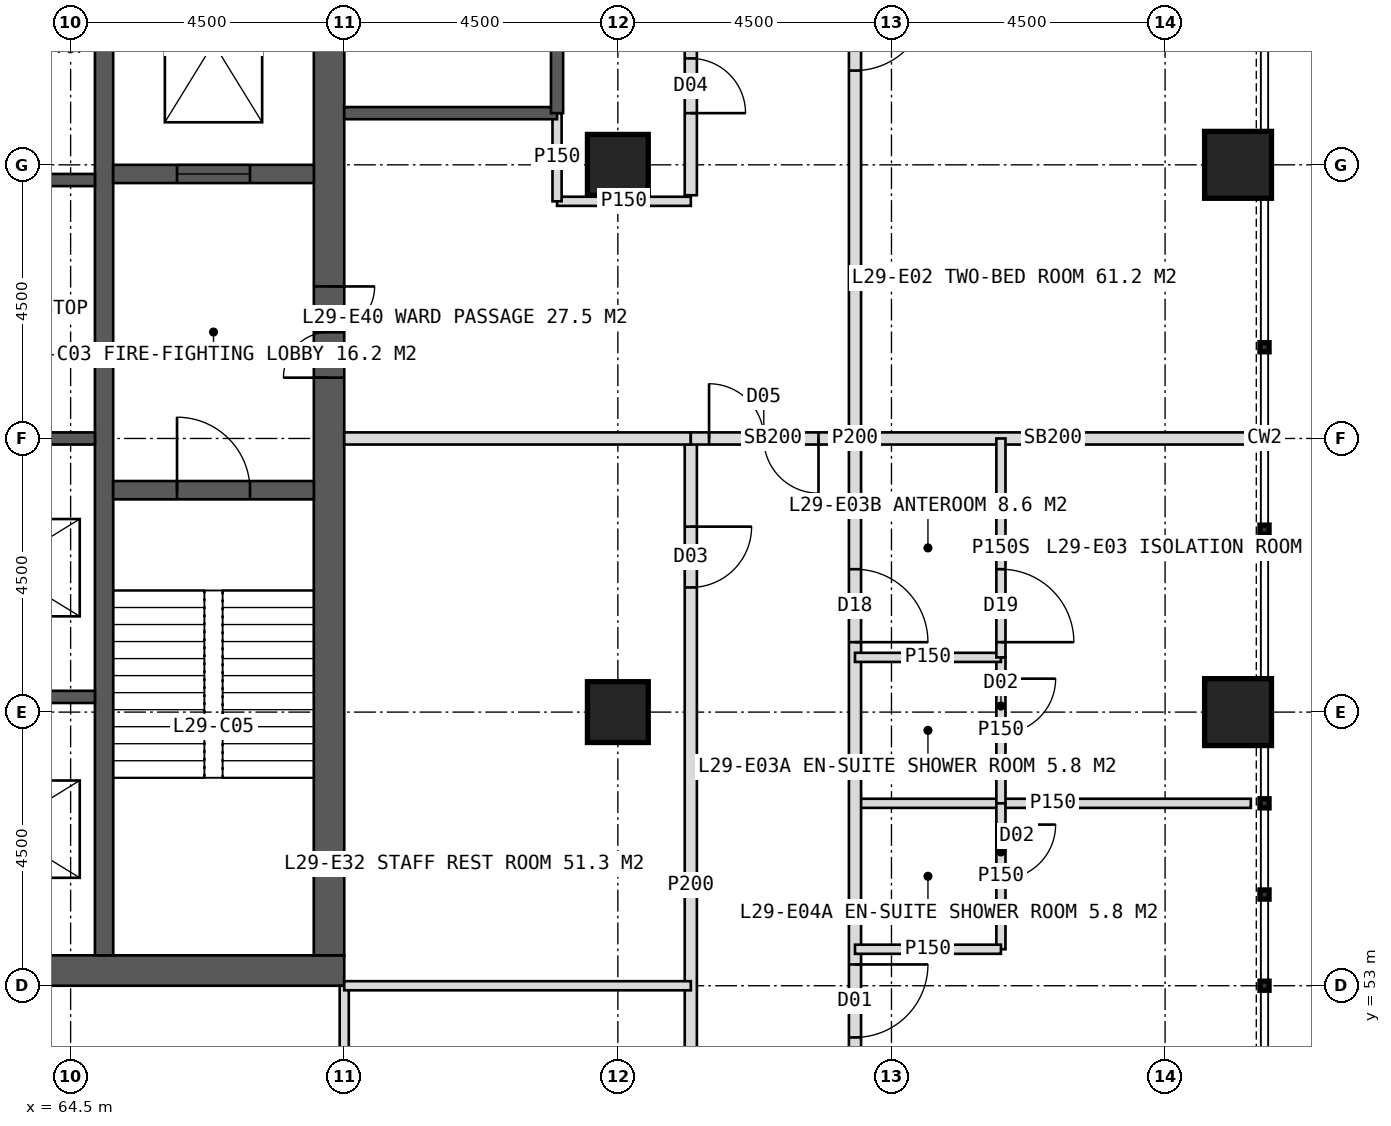
"""IFC4 building model, lengths in metres.
Left out: names, types, materials, properties, quantities, classifications, styles, units other than length and angle.
Written with IfcOpenShell. Run it as: python <this file> out.ifc"""

import sys

from ifc_helpers import new_model, si_unit, direction, frame, frame_2d, origin, origin_2d, place, context, subcontext, project, spatial, rectangle, hollow_rectangle, extrude, element, fill, save


model = new_model("IFC4")
c1 = context("Model", 3, precision=1e-05, world=origin(), true_north=direction((0.0, 1.0)))
c2 = subcontext(c1, "Body", "Model", "MODEL_VIEW")
j1 = project(units=[si_unit("LENGTHUNIT", "METRE"), si_unit("PLANEANGLEUNIT", "RADIAN")], contexts=[c1])
p1 = place(None, origin())
s1 = spatial("IfcSite", under=j1, at=p1, CompositionType="ELEMENT")
p2 = place(p1, origin())
s2 = spatial("IfcBuilding", under=s1, at=p2, CompositionType="ELEMENT")
p3 = place(p2, frame((0.0, 0.0, 124.0)))
s3 = spatial("IfcBuildingStorey", under=s2, at=p3, CompositionType="ELEMENT", Elevation=124.0)
p4 = place(p3, frame((51.0, 53.25, 0.0), z_axis=(0.0, 0.0, 1.0), x_axis=(1.0, 0.0, 0.0)))
e1 = element("IfcWall", 1, at=p4, inside=s3, PredefinedType="SHEAR", context=c2, shape_type="SweptSolid", body=[
    extrude(rectangle(XDim=18.0, YDim=0.5, at=frame_2d((9.0, 0.0))), origin(), (0.0, 0.0, 1.0), 4.0),
])
p5 = place(p4, frame((8.1, 0.0, 0.0)))
e2 = element("IfcOpeningElement", 2, at=p5, cuts=e1, PredefinedType="OPENING", context=c2, shape_type="SweptSolid", body=[
    extrude(rectangle(XDim=1.8, YDim=2.2, at=frame_2d((0.9, 1.1))), frame((0.0, 0.26, 0.0), z_axis=(0.0, -1.0, 0.0), x_axis=(1.0, 0.0, 0.0)), (0.0, 0.0, 1.0), 0.52),
])
p6 = place(p3, frame((68.75, 53.5, 0.0), z_axis=(0.0, 0.0, 1.0), x_axis=(0.0, 1.0, 0.0)))
e3 = element("IfcWall", 3, at=p6, inside=s3, PredefinedType="SHEAR", context=c2, shape_type="SweptSolid", body=[
    extrude(rectangle(XDim=17.0, YDim=0.5, at=frame_2d((8.5, 0.0))), origin(), (0.0, 0.0, 1.0), 4.0),
])
p7 = place(p6, frame((9.5, 0.0, 0.0)))
e4 = element("IfcOpeningElement", 4, at=p7, cuts=e3, PredefinedType="OPENING", context=c2, shape_type="SweptSolid", body=[
    extrude(rectangle(XDim=1.5, YDim=2.2, at=frame_2d((0.75, 1.1))), frame((0.0, 0.26, 0.0), z_axis=(0.0, -1.0, 0.0), x_axis=(1.0, 0.0, 0.0)), (0.0, 0.0, 1.0), 0.52),
])
p8 = place(p3, frame((65.05, 53.5, 0.0), z_axis=(0.0, 0.0, 1.0), x_axis=(0.0, 1.0, 0.0)))
e5 = element("IfcWall", 5, at=p8, inside=s3, PredefinedType="SHEAR", context=c2, shape_type="SweptSolid", body=[
    extrude(rectangle(XDim=17.0, YDim=0.3, at=frame_2d((8.5, 0.0))), origin(), (0.0, 0.0, 1.0), 4.0),
])
for number, where, z_axis, x_axis in (
    (6, (61.85, 57.75, 0.0), (0.0, 0.0, 1.0), (1.0, 0.0, 0.0)),
    (7, (61.85, 62.0, 0.0), (0.0, 0.0, 1.0), (1.0, 0.0, 0.0)),
    (8, (61.85, 66.25, 0.0), (0.0, 0.0, 1.0), (1.0, 0.0, 0.0)),
):
    element("IfcWall", number, at=place(p3, frame(where, z_axis=z_axis, x_axis=x_axis)), inside=s3, PredefinedType="SHEAR", context=c2, shape_type="SweptSolid", body=[
        extrude(rectangle(XDim=3.05, YDim=0.2, at=frame_2d((1.525, 0.0))), origin(), (0.0, 0.0, 1.0), 4.0),
    ])
p9 = place(p3, frame((65.2, 61.15, 0.0), z_axis=(0.0, 0.0, 1.0), x_axis=(1.0, 0.0, 0.0)))
e9 = element("IfcWall", 9, at=p9, inside=s3, PredefinedType="SHEAR", context=c2, shape_type="SweptSolid", body=[
    extrude(rectangle(XDim=3.3, YDim=0.3, at=frame_2d((1.65, 0.0))), origin(), (0.0, 0.0, 1.0), 4.0),
])
p10 = place(p9, frame((1.05, 0.0, 0.0)))
e10 = element("IfcOpeningElement", 10, at=p10, cuts=e9, PredefinedType="OPENING", context=c2, shape_type="SweptSolid", body=[
    extrude(rectangle(XDim=1.2, YDim=2.1, at=frame_2d((0.6, 1.05))), frame((0.0, 0.16, 0.0), z_axis=(0.0, -1.0, 0.0), x_axis=(1.0, 0.0, 0.0)), (0.0, 0.0, 1.0), 0.32),
])
p11 = place(p3, frame((65.2, 66.35, 0.0), z_axis=(0.0, 0.0, 1.0), x_axis=(1.0, 0.0, 0.0)))
e11 = element("IfcWall", 11, at=p11, inside=s3, PredefinedType="SHEAR", context=c2, shape_type="SweptSolid", body=[
    extrude(rectangle(XDim=3.3, YDim=0.3, at=frame_2d((1.65, 0.0))), origin(), (0.0, 0.0, 1.0), 4.0),
])
p12 = place(p11, frame((1.05, 0.0, 0.0)))
e12 = element("IfcOpeningElement", 12, at=p12, cuts=e11, PredefinedType="OPENING", context=c2, shape_type="SweptSolid", body=[
    extrude(rectangle(XDim=1.2, YDim=2.2, at=frame_2d((0.6, 1.1))), frame((0.0, 0.16, 0.0), z_axis=(0.0, -1.0, 0.0), x_axis=(1.0, 0.0, 0.0)), (0.0, 0.0, 1.0), 0.32),
])
for number, where, z_axis, x_axis in (
    (13, (73.5, 57.5, 0.0), (0.0, 0.0, 1.0), (1.0, 0.0, 0.0)),
    (14, (73.5, 66.5, 0.0), (0.0, 0.0, 1.0), (1.0, 0.0, 0.0)),
):
    element("IfcColumn", number, at=place(p3, frame(where, z_axis=z_axis, x_axis=x_axis)), inside=s3, PredefinedType="COLUMN", context=c2, shape_type="SweptSolid", body=[
        extrude(hollow_rectangle(XDim=1.0, YDim=1.0, WallThickness=0.1, at=origin_2d()), origin(), (0.0, 0.0, 1.0), 4.0),
    ])
for number, where, z_axis, x_axis in (
    (15, (83.7, 57.5, 0.0), (0.0, 0.0, 1.0), (1.0, 0.0, 0.0)),
    (16, (83.7, 66.5, 0.0), (0.0, 0.0, 1.0), (1.0, 0.0, 0.0)),
):
    element("IfcColumn", number, at=place(p3, frame(where, z_axis=z_axis, x_axis=x_axis)), inside=s3, PredefinedType="COLUMN", context=c2, shape_type="SweptSolid", body=[
        extrude(hollow_rectangle(XDim=1.1, YDim=1.1, WallThickness=0.1, at=origin_2d()), origin(), (0.0, 0.0, 1.0), 4.0),
    ])
p13 = place(p3, frame((69.0, 53.0, 0.0), z_axis=(0.0, 0.0, 1.0), x_axis=(0.0, -1.0, 0.0)))
e17 = element("IfcWall", 17, at=p13, inside=s3, PredefinedType="PARTITIONING", context=c2, shape_type="SweptSolid", body=[
    extrude(rectangle(XDim=5.7, YDim=0.15, at=frame_2d((2.85, 0.0))), origin(), (0.0, 0.0, 1.0), 3.75),
])
p14 = place(p3, frame((77.4, 62.0, 0.0), z_axis=(0.0, 0.0, 1.0), x_axis=(1.0, 0.0, 0.0)))
e18 = element("IfcWall", 18, at=p14, inside=s3, PredefinedType="SOLIDWALL", context=c2, shape_type="SweptSolid", body=[
    extrude(rectangle(XDim=6.51, YDim=0.2, at=frame_2d((3.255, 0.0))), origin(), (0.0, 0.0, 1.0), 2.95),
])
p15 = place(p3, frame((77.4, 56.0, 0.0), z_axis=(0.0, 0.0, 1.0), x_axis=(1.0, 0.0, 0.0)))
e19 = element("IfcWall", 19, at=p15, inside=s3, PredefinedType="PARTITIONING", context=c2, shape_type="SweptSolid", body=[
    extrude(rectangle(XDim=6.51, YDim=0.15, at=frame_2d((3.255, 0.0))), origin(), (0.0, 0.0, 1.0), 3.75),
])
p16 = place(p3, frame((77.4, 79.4, 0.0), z_axis=(0.0, 0.0, 1.0), x_axis=(0.0, -1.0, 0.0)))
e20 = element("IfcWall", 20, at=p16, inside=s3, PredefinedType="PARTITIONING", context=c2, shape_type="SweptSolid", body=[
    extrude(rectangle(XDim=34.8, YDim=0.2, at=frame_2d((17.4, 0.0))), origin(), (0.0, 0.0, 1.0), 3.75),
])
p17 = place(p16, frame((2.45, 0.0, 0.0)))
e21 = element("IfcOpeningElement", 21, at=p17, cuts=e20, PredefinedType="OPENING", context=c2, shape_type="SweptSolid", body=[
    extrude(rectangle(XDim=1.2, YDim=2.2, at=frame_2d((0.6, 1.1))), frame((0.0, 0.11, 0.0), z_axis=(0.0, -1.0, 0.0), x_axis=(1.0, 0.0, 0.0)), (0.0, 0.0, 1.0), 0.22),
])
p18 = place(p16, frame((10.15, 0.0, 0.0)))
e22 = element("IfcOpeningElement", 22, at=p18, cuts=e20, PredefinedType="OPENING", context=c2, shape_type="SweptSolid", body=[
    extrude(rectangle(XDim=1.2, YDim=2.2, at=frame_2d((0.6, 1.1))), frame((0.0, 0.11, 0.0), z_axis=(0.0, -1.0, 0.0), x_axis=(1.0, 0.0, 0.0)), (0.0, 0.0, 1.0), 0.22),
])
p19 = place(p16, frame((19.55, 0.0, 0.0)))
e23 = element("IfcOpeningElement", 23, at=p19, cuts=e20, PredefinedType="OPENING", context=c2, shape_type="SweptSolid", body=[
    extrude(rectangle(XDim=1.2, YDim=2.2, at=frame_2d((0.6, 1.1))), frame((0.0, 0.11, 0.0), z_axis=(0.0, -1.0, 0.0), x_axis=(1.0, 0.0, 0.0)), (0.0, 0.0, 1.0), 0.22),
])
p20 = place(p16, frame((26.05, 0.0, 0.0)))
e24 = element("IfcOpeningElement", 24, at=p20, cuts=e20, PredefinedType="OPENING", context=c2, shape_type="SweptSolid", body=[
    extrude(rectangle(XDim=1.2, YDim=2.2, at=frame_2d((0.6, 1.1))), frame((0.0, 0.11, 0.0), z_axis=(0.0, -1.0, 0.0), x_axis=(1.0, 0.0, 0.0)), (0.0, 0.0, 1.0), 0.22),
])
p21 = place(p3, frame((79.8, 58.4, 0.0), z_axis=(0.0, 0.0, 1.0), x_axis=(0.0, -1.0, 0.0)))
e25 = element("IfcWall", 25, at=p21, inside=s3, PredefinedType="PARTITIONING", context=c2, shape_type="SweptSolid", body=[
    extrude(rectangle(XDim=2.4, YDim=0.15, at=frame_2d((1.2, 0.0))), origin(), (0.0, 0.0, 1.0), 3.75),
])
p22 = place(p21, frame((0.35, 0.0, 0.0)))
e26 = element("IfcOpeningElement", 26, at=p22, cuts=e25, PredefinedType="OPENING", context=c2, shape_type="SweptSolid", body=[
    extrude(rectangle(XDim=0.9, YDim=2.1, at=frame_2d((0.45, 1.05))), frame((0.0, 0.085, 0.0), z_axis=(0.0, -1.0, 0.0), x_axis=(1.0, 0.0, 0.0)), (0.0, 0.0, 1.0), 0.17),
])
p23 = place(p3, frame((77.4, 58.4, 0.0), z_axis=(0.0, 0.0, 1.0), x_axis=(1.0, 0.0, 0.0)))
e27 = element("IfcWall", 27, at=p23, inside=s3, PredefinedType="PARTITIONING", context=c2, shape_type="SweptSolid", body=[
    extrude(rectangle(XDim=2.4, YDim=0.15, at=frame_2d((1.2, 0.0))), origin(), (0.0, 0.0, 1.0), 3.75),
])
p24 = place(p3, frame((79.8, 62.0, 0.0), z_axis=(0.0, 0.0, 1.0), x_axis=(0.0, -1.0, 0.0)))
e28 = element("IfcWall", 28, at=p24, inside=s3, PredefinedType="PARTITIONING", context=c2, shape_type="SweptSolid", body=[
    extrude(rectangle(XDim=3.6, YDim=0.15, at=frame_2d((1.8, 0.0))), origin(), (0.0, 0.0, 1.0), 3.75),
])
p25 = place(p24, frame((2.15, 0.0, 0.0)))
e29 = element("IfcOpeningElement", 29, at=p25, cuts=e28, PredefinedType="OPENING", context=c2, shape_type="SweptSolid", body=[
    extrude(rectangle(XDim=1.2, YDim=2.2, at=frame_2d((0.6, 1.1))), frame((0.0, 0.085, 0.0), z_axis=(0.0, -1.0, 0.0), x_axis=(1.0, 0.0, 0.0)), (0.0, 0.0, 1.0), 0.17),
])
p26 = place(p3, frame((79.8, 56.0, 0.0), z_axis=(0.0, 0.0, 1.0), x_axis=(0.0, -1.0, 0.0)))
e30 = element("IfcWall", 30, at=p26, inside=s3, PredefinedType="PARTITIONING", context=c2, shape_type="SweptSolid", body=[
    extrude(rectangle(XDim=2.4, YDim=0.15, at=frame_2d((1.2, 0.0))), origin(), (0.0, 0.0, 1.0), 3.75),
])
p27 = place(p26, frame((0.35, 0.0, 0.0)))
e31 = element("IfcOpeningElement", 31, at=p27, cuts=e30, PredefinedType="OPENING", context=c2, shape_type="SweptSolid", body=[
    extrude(rectangle(XDim=0.9, YDim=2.1, at=frame_2d((0.45, 1.05))), frame((0.0, 0.085, 0.0), z_axis=(0.0, -1.0, 0.0), x_axis=(1.0, 0.0, 0.0)), (0.0, 0.0, 1.0), 0.17),
])
p28 = place(p3, frame((77.4, 53.6, 0.0), z_axis=(0.0, 0.0, 1.0), x_axis=(1.0, 0.0, 0.0)))
e32 = element("IfcWall", 32, at=p28, inside=s3, PredefinedType="PARTITIONING", context=c2, shape_type="SweptSolid", body=[
    extrude(rectangle(XDim=2.4, YDim=0.15, at=frame_2d((1.2, 0.0))), origin(), (0.0, 0.0, 1.0), 3.75),
])
p29 = place(p3, frame((74.7, 76.7, 0.0), z_axis=(0.0, 0.0, 1.0), x_axis=(0.0, -1.0, 0.0)))
e33 = element("IfcWall", 33, at=p29, inside=s3, PredefinedType="PARTITIONING", context=c2, shape_type="SweptSolid", body=[
    extrude(rectangle(XDim=10.7, YDim=0.2, at=frame_2d((5.35, 0.0))), origin(), (0.0, 0.0, 1.0), 3.75),
])
p30 = place(p29, frame((1.6, 0.0, 0.0)))
e34 = element("IfcOpeningElement", 34, at=p30, cuts=e33, PredefinedType="OPENING", context=c2, shape_type="SweptSolid", body=[
    extrude(rectangle(XDim=1.0, YDim=2.1, at=frame_2d((0.5, 1.05))), frame((0.0, 0.11, 0.0), z_axis=(0.0, -1.0, 0.0), x_axis=(1.0, 0.0, 0.0)), (0.0, 0.0, 1.0), 0.22),
])
p31 = place(p29, frame((8.45, 0.0, 0.0)))
e35 = element("IfcOpeningElement", 35, at=p31, cuts=e33, PredefinedType="OPENING", context=c2, shape_type="SweptSolid", body=[
    extrude(rectangle(XDim=0.9, YDim=2.1, at=frame_2d((0.45, 1.05))), frame((0.0, 0.11, 0.0), z_axis=(0.0, -1.0, 0.0), x_axis=(1.0, 0.0, 0.0)), (0.0, 0.0, 1.0), 0.22),
])
p32 = place(p3, frame((74.7, 62.0, 0.0), z_axis=(0.0, 0.0, 1.0), x_axis=(0.0, -1.0, 0.0)))
e36 = element("IfcWall", 36, at=p32, inside=s3, PredefinedType="PARTITIONING", context=c2, shape_type="SweptSolid", body=[
    extrude(rectangle(XDim=14.7, YDim=0.2, at=frame_2d((7.35, 0.0))), origin(), (0.0, 0.0, 1.0), 3.75),
])
p33 = place(p32, frame((1.45, 0.0, 0.0)))
e37 = element("IfcOpeningElement", 37, at=p33, cuts=e36, PredefinedType="OPENING", context=c2, shape_type="SweptSolid", body=[
    extrude(rectangle(XDim=1.0, YDim=2.1, at=frame_2d((0.5, 1.05))), frame((0.0, 0.11, 0.0), z_axis=(0.0, -1.0, 0.0), x_axis=(1.0, 0.0, 0.0)), (0.0, 0.0, 1.0), 0.22),
])
p34 = place(p32, frame((11.35, 0.0, 0.0)))
e38 = element("IfcOpeningElement", 38, at=p34, cuts=e36, PredefinedType="OPENING", context=c2, shape_type="SweptSolid", body=[
    extrude(rectangle(XDim=1.0, YDim=2.1, at=frame_2d((0.5, 1.05))), frame((0.0, 0.11, 0.0), z_axis=(0.0, -1.0, 0.0), x_axis=(1.0, 0.0, 0.0)), (0.0, 0.0, 1.0), 0.22),
])
p35 = place(p3, frame((72.5, 65.9, 0.0), z_axis=(0.0, 0.0, 1.0), x_axis=(1.0, 0.0, 0.0)))
e39 = element("IfcWall", 39, at=p35, inside=s3, PredefinedType="PARTITIONING", context=c2, shape_type="SweptSolid", body=[
    extrude(rectangle(XDim=2.2, YDim=0.15, at=frame_2d((1.1, 0.0))), origin(), (0.0, 0.0, 1.0), 3.75),
])
p36 = place(p3, frame((69.0, 62.0, 0.0), z_axis=(0.0, 0.0, 1.0), x_axis=(1.0, 0.0, 0.0)))
e40 = element("IfcWall", 40, at=p36, inside=s3, PredefinedType="SOLIDWALL", context=c2, shape_type="SweptSolid", body=[
    extrude(rectangle(XDim=5.7, YDim=0.2, at=frame_2d((2.85, 0.0))), origin(), (0.0, 0.0, 1.0), 2.95),
])
p37 = place(p3, frame((69.0, 53.0, 0.0), z_axis=(0.0, 0.0, 1.0), x_axis=(1.0, 0.0, 0.0)))
e41 = element("IfcWall", 41, at=p37, inside=s3, PredefinedType="PARTITIONING", context=c2, shape_type="SweptSolid", body=[
    extrude(rectangle(XDim=5.7, YDim=0.15, at=frame_2d((2.85, 0.0))), origin(), (0.0, 0.0, 1.0), 3.75),
])
p38 = place(p3, frame((74.7, 62.0, 0.0), z_axis=(0.0, 0.0, 1.0), x_axis=(1.0, 0.0, 0.0)))
e42 = element("IfcWall", 42, at=p38, inside=s3, PredefinedType="SOLIDWALL", context=c2, shape_type="SweptSolid", body=[
    extrude(rectangle(XDim=2.7, YDim=0.2, at=frame_2d((1.35, 0.0))), origin(), (0.0, 0.0, 1.0), 2.95),
])
p39 = place(p38, frame((0.3, 0.0, 0.0)))
e43 = element("IfcOpeningElement", 43, at=p39, cuts=e42, PredefinedType="OPENING", context=c2, shape_type="SweptSolid", body=[
    extrude(rectangle(XDim=1.8, YDim=2.2, at=frame_2d((0.9, 1.1))), frame((0.0, 0.11, 0.0), z_axis=(0.0, -1.0, 0.0), x_axis=(1.0, 0.0, 0.0)), (0.0, 0.0, 1.0), 0.22),
])
p40 = place(p3, frame((72.5, 65.9, 0.0), z_axis=(0.0, 0.0, 1.0), x_axis=(0.0, 1.0, 0.0)))
e44 = element("IfcWall", 44, at=p40, inside=s3, PredefinedType="PARTITIONING", context=c2, shape_type="SweptSolid", body=[
    extrude(rectangle(XDim=1.45, YDim=0.15, at=frame_2d((0.725, 0.0))), origin(), (0.0, 0.0, 1.0), 3.75),
])
p41 = place(p3, frame((69.0, 67.35, 0.0), z_axis=(0.0, 0.0, 1.0), x_axis=(1.0, 0.0, 0.0)))
e45 = element("IfcWall", 45, at=p41, inside=s3, PredefinedType="SOLIDWALL", context=c2, shape_type="SweptSolid", body=[
    extrude(rectangle(XDim=3.5, YDim=0.2, at=frame_2d((1.75, 0.0))), origin(), (0.0, 0.0, 1.0), 3.75),
])
p42 = place(p3, frame((72.5, 67.35, 0.0), z_axis=(0.0, 0.0, 1.0), x_axis=(0.0, 1.0, 0.0)))
e46 = element("IfcWall", 46, at=p42, inside=s3, PredefinedType="SOLIDWALL", context=c2, shape_type="SweptSolid", body=[
    extrude(rectangle(XDim=7.75, YDim=0.2, at=frame_2d((3.875, 0.0))), origin(), (0.0, 0.0, 1.0), 3.75),
])
p43 = place(p18, origin())
e47 = element("IfcDoor", 47, at=p43, inside=s3, OperationType="SINGLE_SWING_LEFT", PredefinedType="DOOR", context=c2, shape_type="SweptSolid", body=[
    extrude(rectangle(XDim=1.2, YDim=2.2, at=frame_2d((0.6, 1.1))), frame((0.0, 0.025, 0.0), z_axis=(0.0, -1.0, 0.0), x_axis=(1.0, 0.0, 0.0)), (0.0, 0.0, 1.0), 0.05),
])
fill(e22, e47)
p44 = place(p25, origin())
e48 = element("IfcDoor", 48, at=p44, inside=s3, OperationType="SINGLE_SWING_RIGHT", PredefinedType="DOOR", context=c2, shape_type="SweptSolid", body=[
    extrude(rectangle(XDim=1.2, YDim=2.2, at=frame_2d((0.6, 1.1))), frame((0.0, 0.025, 0.0), z_axis=(0.0, -1.0, 0.0), x_axis=(1.0, 0.0, 0.0)), (0.0, 0.0, 1.0), 0.05),
])
fill(e29, e48)
p45 = place(p19, origin())
e49 = element("IfcDoor", 49, at=p45, inside=s3, OperationType="SINGLE_SWING_RIGHT", PredefinedType="DOOR", context=c2, shape_type="SweptSolid", body=[
    extrude(rectangle(XDim=1.2, YDim=2.2, at=frame_2d((0.6, 1.1))), frame((0.0, 0.025, 0.0), z_axis=(0.0, -1.0, 0.0), x_axis=(1.0, 0.0, 0.0)), (0.0, 0.0, 1.0), 0.05),
])
fill(e23, e49)
p46 = place(p22, origin())
e50 = element("IfcDoor", 50, at=p46, inside=s3, OperationType="SINGLE_SWING_LEFT", PredefinedType="DOOR", context=c2, shape_type="SweptSolid", body=[
    extrude(rectangle(XDim=0.9, YDim=2.1, at=frame_2d((0.45, 1.05))), frame((0.0, 0.025, 0.0), z_axis=(0.0, -1.0, 0.0), x_axis=(1.0, 0.0, 0.0)), (0.0, 0.0, 1.0), 0.05),
])
fill(e26, e50)
p47 = place(p20, origin())
e51 = element("IfcDoor", 51, at=p47, inside=s3, OperationType="SINGLE_SWING_LEFT", PredefinedType="DOOR", context=c2, shape_type="SweptSolid", body=[
    extrude(rectangle(XDim=1.2, YDim=2.2, at=frame_2d((0.6, 1.1))), frame((0.0, 0.025, 0.0), z_axis=(0.0, -1.0, 0.0), x_axis=(1.0, 0.0, 0.0)), (0.0, 0.0, 1.0), 0.05),
])
fill(e24, e51)
p48 = place(p27, origin())
e52 = element("IfcDoor", 52, at=p48, inside=s3, OperationType="SINGLE_SWING_LEFT", PredefinedType="DOOR", context=c2, shape_type="SweptSolid", body=[
    extrude(rectangle(XDim=0.9, YDim=2.1, at=frame_2d((0.45, 1.05))), frame((0.0, 0.025, 0.0), z_axis=(0.0, -1.0, 0.0), x_axis=(1.0, 0.0, 0.0)), (0.0, 0.0, 1.0), 0.05),
])
fill(e31, e52)
p49 = place(p31, origin())
e53 = element("IfcDoor", 53, at=p49, inside=s3, OperationType="SINGLE_SWING_RIGHT", PredefinedType="DOOR", context=c2, shape_type="SweptSolid", body=[
    extrude(rectangle(XDim=0.9, YDim=2.1, at=frame_2d((0.45, 1.05))), frame((0.0, 0.025, 0.0), z_axis=(0.0, -1.0, 0.0), x_axis=(1.0, 0.0, 0.0)), (0.0, 0.0, 1.0), 0.05),
])
fill(e35, e53)
p50 = place(p33, origin())
e54 = element("IfcDoor", 54, at=p50, inside=s3, OperationType="SINGLE_SWING_LEFT", PredefinedType="DOOR", context=c2, shape_type="SweptSolid", body=[
    extrude(rectangle(XDim=1.0, YDim=2.1, at=frame_2d((0.5, 1.05))), frame((0.0, 0.025, 0.0), z_axis=(0.0, -1.0, 0.0), x_axis=(1.0, 0.0, 0.0)), (0.0, 0.0, 1.0), 0.05),
])
fill(e37, e54)
p51 = place(p39, origin())
e55 = element("IfcDoor", 55, at=p51, inside=s3, OperationType="DOUBLE_DOOR_DOUBLE_SWING", PredefinedType="DOOR", context=c2, shape_type="SweptSolid", body=[
    extrude(rectangle(XDim=1.8, YDim=2.2, at=frame_2d((0.9, 1.1))), frame((0.0, 0.025, 0.0), z_axis=(0.0, -1.0, 0.0), x_axis=(1.0, 0.0, 0.0)), (0.0, 0.0, 1.0), 0.05),
])
fill(e43, e55)
p52 = place(p7, origin())
e56 = element("IfcDoor", 56, at=p52, inside=s3, OperationType="DOUBLE_DOOR_SINGLE_SWING", PredefinedType="DOOR", context=c2, shape_type="SweptSolid", body=[
    extrude(rectangle(XDim=1.5, YDim=2.2, at=frame_2d((0.75, 1.1))), frame((0.0, 0.025, 0.0), z_axis=(0.0, -1.0, 0.0), x_axis=(1.0, 0.0, 0.0)), (0.0, 0.0, 1.0), 0.05),
])
fill(e4, e56)
p53 = place(p10, origin())
e57 = element("IfcDoor", 57, at=p53, inside=s3, OperationType="SINGLE_SWING_LEFT", PredefinedType="DOOR", context=c2, shape_type="SweptSolid", body=[
    extrude(rectangle(XDim=1.2, YDim=2.1, at=frame_2d((0.6, 1.05))), frame((0.0, 0.025, 0.0), z_axis=(0.0, -1.0, 0.0), x_axis=(1.0, 0.0, 0.0)), (0.0, 0.0, 1.0), 0.05),
])
fill(e10, e57)
p54 = place(p12, origin())
e58 = element("IfcDoor", 58, at=p54, inside=s3, OperationType="SLIDING_TO_LEFT", PredefinedType="DOOR", context=c2, shape_type="SweptSolid", body=[
    extrude(rectangle(XDim=1.2, YDim=2.2, at=frame_2d((0.6, 1.1))), frame((0.0, 0.025, 0.0), z_axis=(0.0, -1.0, 0.0), x_axis=(1.0, 0.0, 0.0)), (0.0, 0.0, 1.0), 0.05),
])
fill(e12, e58)
save(model, sys.argv[1])
